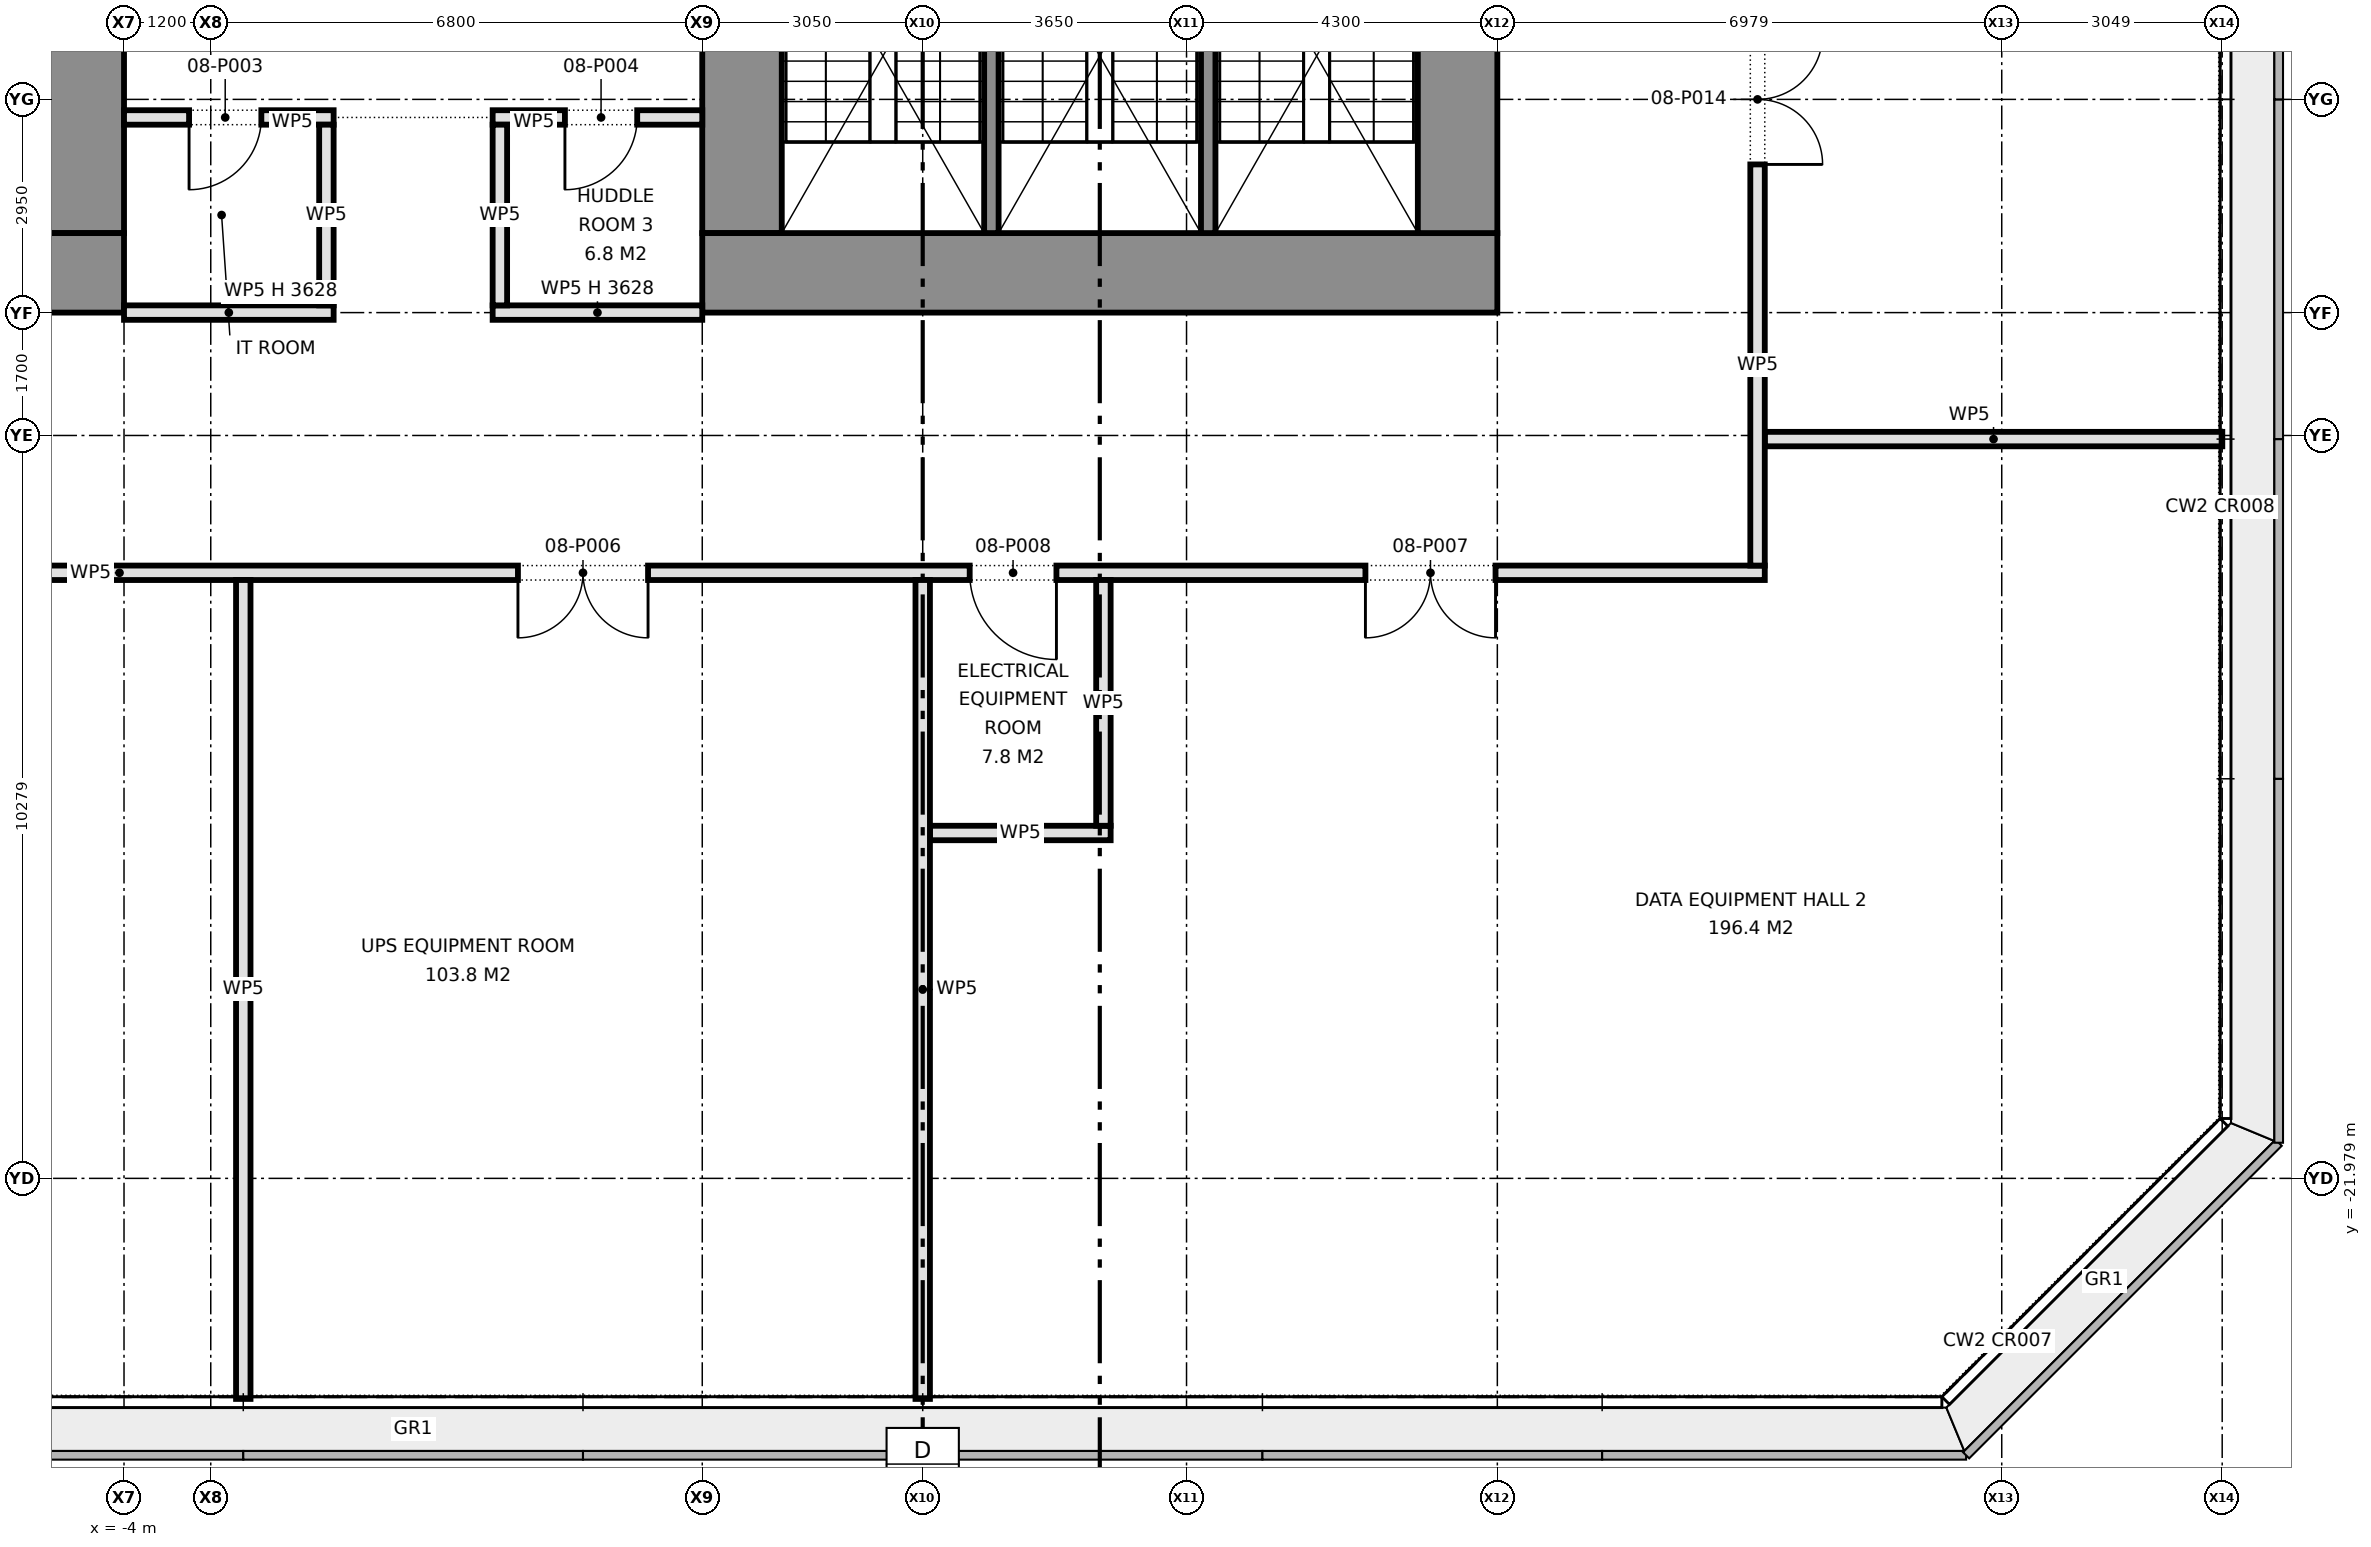
"""IFC4 building model, lengths in metres.
Left out: names, types, materials, properties, quantities, classifications, styles, units other than length and angle.
Written with IfcOpenShell. Run it as: python <this file> out.ifc"""

import sys

from ifc_helpers import new_model, si_unit, direction, frame, frame_2d, origin, place, context, subcontext, project, spatial, rectangle, extrude, element, fill, save


model = new_model("IFC4")
c1 = context("Model", 3, precision=1e-05, world=origin(), true_north=direction((0.0, 1.0)))
c2 = subcontext(c1, "Body", "Model", "MODEL_VIEW")
j1 = project(units=[si_unit("LENGTHUNIT", "METRE"), si_unit("PLANEANGLEUNIT", "RADIAN")], contexts=[c1])
p1 = place(None, origin())
s1 = spatial("IfcSite", under=j1, at=p1, CompositionType="ELEMENT")
p2 = place(p1, origin())
s2 = spatial("IfcBuilding", under=s1, at=p2, CompositionType="ELEMENT")
p3 = place(p2, frame((0.0, 0.0, 35.3)))
s3 = spatial("IfcBuildingStorey", under=s2, at=p3, CompositionType="ELEMENT", Elevation=35.3)
p4 = place(p3, frame((-15.0, -9.45, 0.0), z_axis=(0.0, 0.0, 1.0), x_axis=(1.0, 0.0, 0.0)))
e1 = element("IfcWall", 1, at=p4, inside=s3, PredefinedType="SHEAR", context=c2, shape_type="SweptSolid", body=[
    extrude(rectangle(XDim=11.0, YDim=1.1, at=frame_2d((5.5, 0.0))), origin(), (0.0, 0.0, 1.0), 4.575),
])
p5 = place(p3, frame((-4.55, -8.9, 0.0), z_axis=(0.0, 0.0, 1.0), x_axis=(0.0, 1.0, 0.0)))
e2 = element("IfcWall", 2, at=p5, inside=s3, PredefinedType="SHEAR", context=c2, shape_type="SweptSolid", body=[
    extrude(rectangle(XDim=3.15, YDim=1.1, at=frame_2d((1.575, 0.0))), origin(), (0.0, 0.0, 1.0), 4.575),
])
p6 = place(p3, frame((15.0, -9.45, 0.0), z_axis=(0.0, 0.0, 1.0), x_axis=(-1.0, 0.0, 0.0)))
e3 = element("IfcWall", 3, at=p6, inside=s3, PredefinedType="SHEAR", context=c2, shape_type="SweptSolid", body=[
    extrude(rectangle(XDim=11.0, YDim=1.1, at=frame_2d((5.5, 0.0))), origin(), (0.0, 0.0, 1.0), 4.575),
])
p7 = place(p3, frame((14.45, -3.68, 0.0), z_axis=(0.0, 0.0, 1.0), x_axis=(0.0, -1.0, 0.0)))
e4 = element("IfcWall", 4, at=p7, inside=s3, PredefinedType="SHEAR", context=c2, shape_type="SweptSolid", body=[
    extrude(rectangle(XDim=5.22, YDim=1.1, at=frame_2d((2.61, 0.0))), origin(), (0.0, 0.0, 1.0), 4.575),
])
p8 = place(p3, frame((4.55, -1.55, 0.0), z_axis=(0.0, 0.0, 1.0), x_axis=(0.0, -1.0, 0.0)))
e5 = element("IfcWall", 5, at=p8, inside=s3, PredefinedType="SHEAR", context=c2, shape_type="SweptSolid", body=[
    extrude(rectangle(XDim=7.35, YDim=1.1, at=frame_2d((3.675, 0.0))), origin(), (0.0, 0.0, 1.0), 4.575),
])
for number, where, z_axis, x_axis in (
    (6, (11.0, -2.38, 0.0), (0.0, 0.0, 1.0), (0.0, -1.0, 0.0)),
    (7, (8.0, -2.38, 0.0), (0.0, 0.0, 1.0), (0.0, -1.0, 0.0)),
):
    element("IfcWall", number, at=place(p3, frame(where, z_axis=z_axis, x_axis=x_axis)), inside=s3, PredefinedType="SHEAR", context=c2, shape_type="SweptSolid", body=[
        extrude(rectangle(XDim=6.52, YDim=0.2, at=frame_2d((3.26, 0.0))), origin(), (0.0, 0.0, 1.0), 4.575),
    ])
p9 = place(p3, frame((7.15, -17.2, 0.0), z_axis=(0.0, 0.0, 1.0), x_axis=(1.0, 0.0, 0.0)))
e8 = element("IfcWall", 8, at=p9, inside=s3, PredefinedType="PARTITIONING", context=c2, shape_type="SweptSolid", body=[
    extrude(rectangle(XDim=2.5, YDim=0.2, at=frame_2d((1.25, 0.0))), origin(), (0.0, 0.0, 1.0), 4.575),
])
p10 = place(p3, frame((-18.7, -13.6, 0.0), z_axis=(0.0, 0.0, 1.0), x_axis=(1.0, 0.0, 0.0)))
e9 = element("IfcWall", 9, at=p10, inside=s3, PredefinedType="PARTITIONING", context=c2, shape_type="SweptSolid", body=[
    extrude(rectangle(XDim=37.4, YDim=0.2, at=frame_2d((18.7, 0.0))), origin(), (0.0, 0.0, 1.0), 4.575),
])
p11 = place(p10, frame((7.325, 0.0, 0.0)))
e10 = element("IfcOpeningElement", 10, at=p11, cuts=e9, PredefinedType="OPENING", context=c2, shape_type="SweptSolid", body=[
    extrude(rectangle(XDim=1.8, YDim=2.1, at=frame_2d((0.9, 1.05))), frame((0.0, 0.11, 0.0), z_axis=(0.0, -1.0, 0.0), x_axis=(1.0, 0.0, 0.0)), (0.0, 0.0, 1.0), 0.22),
])
p12 = place(p10, frame((20.15, 0.0, 0.0)))
e11 = element("IfcOpeningElement", 11, at=p12, cuts=e9, PredefinedType="OPENING", context=c2, shape_type="SweptSolid", body=[
    extrude(rectangle(XDim=1.8, YDim=2.1, at=frame_2d((0.9, 1.05))), frame((0.0, 0.11, 0.0), z_axis=(0.0, -1.0, 0.0), x_axis=(1.0, 0.0, 0.0)), (0.0, 0.0, 1.0), 0.22),
])
p13 = place(p10, frame((31.875, 0.0, 0.0)))
e12 = element("IfcOpeningElement", 12, at=p13, cuts=e9, PredefinedType="OPENING", context=c2, shape_type="SweptSolid", body=[
    extrude(rectangle(XDim=1.8, YDim=2.1, at=frame_2d((0.9, 1.05))), frame((0.0, 0.11, 0.0), z_axis=(0.0, -1.0, 0.0), x_axis=(1.0, 0.0, 0.0)), (0.0, 0.0, 1.0), 0.22),
])
p14 = place(p10, frame((26.4, 0.0, 0.0)))
e13 = element("IfcOpeningElement", 13, at=p14, cuts=e9, PredefinedType="OPENING", context=c2, shape_type="SweptSolid", body=[
    extrude(rectangle(XDim=1.2, YDim=2.1, at=frame_2d((0.6, 1.05))), frame((0.0, 0.11, 0.0), z_axis=(0.0, -1.0, 0.0), x_axis=(1.0, 0.0, 0.0)), (0.0, 0.0, 1.0), 0.22),
])
p15 = place(p3, frame((18.7, -11.75, 0.0), z_axis=(0.0, 0.0, 1.0), x_axis=(1.0, 0.0, 0.0)))
e14 = element("IfcWall", 14, at=p15, inside=s3, PredefinedType="PARTITIONING", context=c2, shape_type="SweptSolid", body=[
    extrude(rectangle(XDim=6.33, YDim=0.2, at=frame_2d((3.165, 0.0))), origin(), (0.0, 0.0, 1.0), 4.575),
])
for number, where, z_axis, x_axis in (
    (15, (-4.0, -10.0, 0.0), (0.0, 0.0, 1.0), (1.0, 0.0, 0.0)),
    (16, (1.1, -10.0, 0.0), (0.0, 0.0, 1.0), (1.0, 0.0, 0.0)),
):
    element("IfcWall", number, at=place(p3, frame(where, z_axis=z_axis, x_axis=x_axis)), inside=s3, PredefinedType="PARTITIONING", context=c2, shape_type="SweptSolid", body=[
        extrude(rectangle(XDim=2.9, YDim=0.2, at=frame_2d((1.45, 0.0))), origin(), (0.0, 0.0, 1.0), 3.627),
    ])
p16 = place(p3, frame((-4.0, -7.3, 0.0), z_axis=(0.0, 0.0, 1.0), x_axis=(1.0, 0.0, 0.0)))
e17 = element("IfcWall", 17, at=p16, inside=s3, PredefinedType="PARTITIONING", context=c2, shape_type="SweptSolid", body=[
    extrude(rectangle(XDim=2.9, YDim=0.2, at=frame_2d((1.45, 0.0))), origin(), (0.0, 0.0, 1.0), 4.575),
])
p17 = place(p16, frame((0.9, 0.0, 0.0)))
e18 = element("IfcOpeningElement", 18, at=p17, cuts=e17, PredefinedType="OPENING", context=c2, shape_type="SweptSolid", body=[
    extrude(rectangle(XDim=1.0, YDim=2.1, at=frame_2d((0.5, 1.05))), frame((0.0, 0.11, 0.0), z_axis=(0.0, -1.0, 0.0), x_axis=(1.0, 0.0, 0.0)), (0.0, 0.0, 1.0), 0.22),
])
p18 = place(p3, frame((1.1, -7.3, 0.0), z_axis=(0.0, 0.0, 1.0), x_axis=(1.0, 0.0, 0.0)))
e19 = element("IfcWall", 19, at=p18, inside=s3, PredefinedType="PARTITIONING", context=c2, shape_type="SweptSolid", body=[
    extrude(rectangle(XDim=2.9, YDim=0.2, at=frame_2d((1.45, 0.0))), origin(), (0.0, 0.0, 1.0), 4.575),
])
p19 = place(p18, frame((1.0, 0.0, 0.0)))
e20 = element("IfcOpeningElement", 20, at=p19, cuts=e19, PredefinedType="OPENING", context=c2, shape_type="SweptSolid", body=[
    extrude(rectangle(XDim=1.0, YDim=2.1, at=frame_2d((0.5, 1.05))), frame((0.0, 0.11, 0.0), z_axis=(0.0, -1.0, 0.0), x_axis=(1.0, 0.0, 0.0)), (0.0, 0.0, 1.0), 0.22),
])
p20 = place(p3, frame((18.6, -13.5, 0.0), z_axis=(0.0, 0.0, 1.0), x_axis=(0.0, 1.0, 0.0)))
e21 = element("IfcWall", 21, at=p20, inside=s3, PredefinedType="PARTITIONING", context=c2, shape_type="SweptSolid", body=[
    extrude(rectangle(XDim=27.0, YDim=0.2, at=frame_2d((13.5, 0.0))), origin(), (0.0, 0.0, 1.0), 4.575),
])
p21 = place(p20, frame((5.55, 0.0, 0.0)))
e22 = element("IfcOpeningElement", 22, at=p21, cuts=e21, PredefinedType="OPENING", context=c2, shape_type="SweptSolid", body=[
    extrude(rectangle(XDim=1.8, YDim=2.1, at=frame_2d((0.9, 1.05))), frame((0.0, 0.11, 0.0), z_axis=(0.0, -1.0, 0.0), x_axis=(1.0, 0.0, 0.0)), (0.0, 0.0, 1.0), 0.22),
])
p22 = place(p20, frame((21.7, 0.0, 0.0)))
e23 = element("IfcOpeningElement", 23, at=p22, cuts=e21, PredefinedType="OPENING", context=c2, shape_type="SweptSolid", body=[
    extrude(rectangle(XDim=1.2, YDim=2.1, at=frame_2d((0.6, 1.05))), frame((0.0, 0.11, 0.0), z_axis=(0.0, -1.0, 0.0), x_axis=(1.0, 0.0, 0.0)), (0.0, 0.0, 1.0), 0.22),
])
p23 = place(p20, frame((12.15, 0.0, 0.0)))
e24 = element("IfcOpeningElement", 24, at=p23, cuts=e21, PredefinedType="OPENING", context=c2, shape_type="SweptSolid", body=[
    extrude(rectangle(XDim=1.0, YDim=2.1, at=frame_2d((0.5, 1.05))), frame((0.0, 0.11, 0.0), z_axis=(0.0, -1.0, 0.0), x_axis=(1.0, 0.0, 0.0)), (0.0, 0.0, 1.0), 0.22),
])
p24 = place(p20, frame((15.15, 0.0, 0.0)))
e25 = element("IfcOpeningElement", 25, at=p24, cuts=e21, PredefinedType="OPENING", context=c2, shape_type="SweptSolid", body=[
    extrude(rectangle(XDim=1.0, YDim=2.1, at=frame_2d((0.5, 1.05))), frame((0.0, 0.11, 0.0), z_axis=(0.0, -1.0, 0.0), x_axis=(1.0, 0.0, 0.0)), (0.0, 0.0, 1.0), 0.22),
])
p25 = place(p20, frame((17.75, 0.0, 0.0)))
e26 = element("IfcOpeningElement", 26, at=p25, cuts=e21, PredefinedType="OPENING", context=c2, shape_type="SweptSolid", body=[
    extrude(rectangle(XDim=1.0, YDim=2.1, at=frame_2d((0.5, 1.05))), frame((0.0, 0.11, 0.0), z_axis=(0.0, -1.0, 0.0), x_axis=(1.0, 0.0, 0.0)), (0.0, 0.0, 1.0), 0.22),
])
p26 = place(p3, frame((9.55, -17.1, 0.0), z_axis=(0.0, 0.0, 1.0), x_axis=(0.0, 1.0, 0.0)))
e27 = element("IfcWall", 27, at=p26, inside=s3, PredefinedType="PARTITIONING", context=c2, shape_type="SweptSolid", body=[
    extrude(rectangle(XDim=3.4, YDim=0.2, at=frame_2d((1.7, 0.0))), origin(), (0.0, 0.0, 1.0), 4.575),
])
p27 = place(p3, frame((7.05, -25.03, 0.0), z_axis=(0.0, 0.0, 1.0), x_axis=(0.0, 1.0, 0.0)))
e28 = element("IfcWall", 28, at=p27, inside=s3, PredefinedType="PARTITIONING", context=c2, shape_type="SweptSolid", body=[
    extrude(rectangle(XDim=11.33, YDim=0.2, at=frame_2d((5.665, 0.0))), origin(), (0.0, 0.0, 1.0), 4.575),
])
for number, where, z_axis, x_axis in (
    (29, (1.2, -9.9, 0.0), (0.0, 0.0, 1.0), (0.0, 1.0, 0.0)),
    (30, (-1.2, -9.9, 0.0), (0.0, 0.0, 1.0), (0.0, 1.0, 0.0)),
):
    element("IfcWall", number, at=place(p3, frame(where, z_axis=z_axis, x_axis=x_axis)), inside=s3, PredefinedType="PARTITIONING", context=c2, shape_type="SweptSolid", body=[
        extrude(rectangle(XDim=2.5, YDim=0.2, at=frame_2d((1.25, 0.0))), origin(), (0.0, 0.0, 1.0), 4.575),
    ])
p28 = place(p3, frame((-2.35, -25.03, 0.0), z_axis=(0.0, 0.0, 1.0), x_axis=(0.0, 1.0, 0.0)))
e31 = element("IfcWall", 31, at=p28, inside=s3, PredefinedType="PARTITIONING", context=c2, shape_type="SweptSolid", body=[
    extrude(rectangle(XDim=11.33, YDim=0.2, at=frame_2d((5.665, 0.0))), origin(), (0.0, 0.0, 1.0), 4.575),
])
p29 = place(p17, frame((1.0, 0.0, 0.0), z_axis=(0.0, 0.0, 1.0), x_axis=(-1.0, 0.0, 0.0)))
e32 = element("IfcDoor", 32, at=p29, inside=s3, OperationType="SINGLE_SWING_RIGHT", PredefinedType="DOOR", context=c2, shape_type="SweptSolid", body=[
    extrude(rectangle(XDim=1.0, YDim=2.1, at=frame_2d((0.5, 1.05))), frame((0.0, 0.025, 0.0), z_axis=(0.0, -1.0, 0.0), x_axis=(1.0, 0.0, 0.0)), (0.0, 0.0, 1.0), 0.05),
])
fill(e18, e32)
p30 = place(p19, frame((1.0, 0.0, 0.0), z_axis=(0.0, 0.0, 1.0), x_axis=(-1.0, 0.0, 0.0)))
e33 = element("IfcDoor", 33, at=p30, inside=s3, OperationType="SINGLE_SWING_RIGHT", PredefinedType="DOOR", context=c2, shape_type="SweptSolid", body=[
    extrude(rectangle(XDim=1.0, YDim=2.1, at=frame_2d((0.5, 1.05))), frame((0.0, 0.025, 0.0), z_axis=(0.0, -1.0, 0.0), x_axis=(1.0, 0.0, 0.0)), (0.0, 0.0, 1.0), 0.05),
])
fill(e20, e33)
p31 = place(p12, frame((1.8, 0.0, 0.0), z_axis=(0.0, 0.0, 1.0), x_axis=(-1.0, 0.0, 0.0)))
e34 = element("IfcDoor", 34, at=p31, inside=s3, OperationType="DOUBLE_DOOR_SINGLE_SWING", PredefinedType="DOOR", context=c2, shape_type="SweptSolid", body=[
    extrude(rectangle(XDim=1.8, YDim=2.1, at=frame_2d((0.9, 1.05))), frame((0.0, 0.025, 0.0), z_axis=(0.0, -1.0, 0.0), x_axis=(1.0, 0.0, 0.0)), (0.0, 0.0, 1.0), 0.05),
])
fill(e11, e34)
p32 = place(p13, frame((1.8, 0.0, 0.0), z_axis=(0.0, 0.0, 1.0), x_axis=(-1.0, 0.0, 0.0)))
e35 = element("IfcDoor", 35, at=p32, inside=s3, OperationType="DOUBLE_DOOR_SINGLE_SWING", PredefinedType="DOOR", context=c2, shape_type="SweptSolid", body=[
    extrude(rectangle(XDim=1.8, YDim=2.1, at=frame_2d((0.9, 1.05))), frame((0.0, 0.025, 0.0), z_axis=(0.0, -1.0, 0.0), x_axis=(1.0, 0.0, 0.0)), (0.0, 0.0, 1.0), 0.05),
])
fill(e12, e35)
p33 = place(p14, frame((1.2, 0.0, 0.0), z_axis=(0.0, 0.0, 1.0), x_axis=(-1.0, 0.0, 0.0)))
e36 = element("IfcDoor", 36, at=p33, inside=s3, OperationType="SINGLE_SWING_LEFT", PredefinedType="DOOR", context=c2, shape_type="SweptSolid", body=[
    extrude(rectangle(XDim=1.2, YDim=2.1, at=frame_2d((0.6, 1.05))), frame((0.0, 0.025, 0.0), z_axis=(0.0, -1.0, 0.0), x_axis=(1.0, 0.0, 0.0)), (0.0, 0.0, 1.0), 0.05),
])
fill(e13, e36)
p34 = place(p21, frame((1.8, 0.0, 0.0), z_axis=(0.0, 0.0, 1.0), x_axis=(-1.0, 0.0, 0.0)))
e37 = element("IfcDoor", 37, at=p34, inside=s3, OperationType="DOUBLE_DOOR_SINGLE_SWING", PredefinedType="DOOR", context=c2, shape_type="SweptSolid", body=[
    extrude(rectangle(XDim=1.8, YDim=2.1, at=frame_2d((0.9, 1.05))), frame((0.0, 0.025, 0.0), z_axis=(0.0, -1.0, 0.0), x_axis=(1.0, 0.0, 0.0)), (0.0, 0.0, 1.0), 0.05),
])
fill(e22, e37)
save(model, sys.argv[1])
